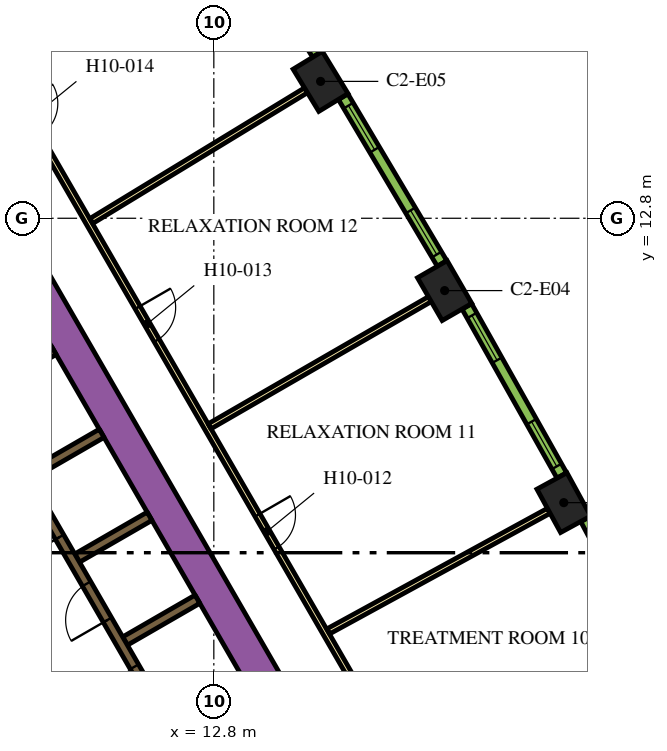
"""IFC4 building model, lengths in metres.
Left out: names, types, materials, properties, quantities, classifications, styles, units other than length and angle.
Written with IfcOpenShell. Run it as: python <this file> out.ifc"""

import sys

from ifc_helpers import new_model, si_unit, direction, frame, frame_2d, origin, origin_2d, place, context, subcontext, project, spatial, rectangle, extrude, element, fill, save


model = new_model("IFC4")
c1 = context("Model", 3, precision=1e-05, world=origin(), true_north=direction((0.0, 1.0)))
c2 = subcontext(c1, "Body", "Model", "MODEL_VIEW")
j1 = project(units=[si_unit("LENGTHUNIT", "METRE"), si_unit("PLANEANGLEUNIT", "RADIAN")], contexts=[c1])
p1 = place(None, origin())
s1 = spatial("IfcSite", under=j1, at=p1, CompositionType="ELEMENT")
p2 = place(p1, origin())
s2 = spatial("IfcBuilding", under=s1, at=p2, CompositionType="ELEMENT")
p3 = place(p2, frame((0.0, 0.0, 130.5)))
s3 = spatial("IfcBuildingStorey", under=s2, at=p3, CompositionType="ELEMENT", Elevation=130.5)
for number, where, z_axis, x_axis in (
    (1, (22.009, 5.317, 0.0), (0.0, 0.0, 1.0), (-0.48, 0.877, 0.0)),
    (2, (18.874, 10.897, 0.0), (0.0, 0.0, 1.0), (-0.5, 0.866, 0.0)),
    (3, (15.609, 16.402, 0.0), (0.0, 0.0, 1.0), (-0.52, 0.854, 0.0)),
):
    element("IfcColumn", number, at=place(p3, frame(where, z_axis=z_axis, x_axis=x_axis)), inside=s3, PredefinedType="COLUMN", context=c2, shape_type="SweptSolid", body=[
        extrude(rectangle(XDim=1.3, YDim=0.9, at=origin_2d()), origin(), (0.0, 0.0, 1.0), 3.9),
    ])
p4 = place(p3, frame((6.776, 13.364, 0.0), z_axis=(0.0, 0.0, 1.0), x_axis=(0.500004177138, -0.8660229921, 0.0)))
e4 = element("IfcWall", 4, at=p4, inside=s3, PredefinedType="SOLIDWALL", context=c2, shape_type="SweptSolid", body=[
    extrude(rectangle(XDim=20.204, YDim=0.9, at=frame_2d((10.102, 0.0))), origin(), (0.0, 0.0, 1.0), 3.9),
])
for number, where, z_axis, x_axis in (
    (5, (6.684, 8.224, 0.0), (0.0, 0.0, 1.0), (0.866, 0.5, 0.0)),
    (6, (7.944, 6.041, 0.0), (0.0, 0.0, 1.0), (0.866, 0.5, 0.0)),
    (7, (9.204, 3.859, 0.0), (0.0, 0.0, 1.0), (0.866, 0.5, 0.0)),
    (8, (10.464, 1.677, 0.0), (0.0, 0.0, 1.0), (0.866, 0.5, 0.0)),
):
    element("IfcWall", number, at=place(p3, frame(where, z_axis=z_axis, x_axis=x_axis)), inside=s3, PredefinedType="SOLIDWALL", context=c2, shape_type="SweptSolid", body=[
        extrude(rectangle(XDim=2.2, YDim=0.25, at=frame_2d((1.1, 0.0))), origin(), (0.0, 0.0, 1.0), 3.9),
    ])
p5 = place(p3, frame((11.553, -0.46, 0.0), z_axis=(0.0, 0.0, 1.0), x_axis=(-0.500006514828, 0.866021642414, 0.0)))
e9 = element("IfcWall", 9, at=p5, inside=s3, PredefinedType="SOLIDWALL", context=c2, shape_type="SweptSolid", body=[
    extrude(rectangle(XDim=12.35, YDim=0.25, at=frame_2d((6.175, 0.0))), origin(), (0.0, 0.0, 1.0), 3.9),
])
p6 = place(p5, frame((0.585, 0.0, 0.0)))
e10 = element("IfcOpeningElement", 10, at=p6, cuts=e9, PredefinedType="OPENING", context=c2, shape_type="SweptSolid", body=[
    extrude(rectangle(XDim=1.1, YDim=2.1, at=frame_2d((0.55, 1.05))), frame((0.0, 0.135, 0.0), z_axis=(0.0, -1.0, 0.0), x_axis=(1.0, 0.0, 0.0)), (0.0, 0.0, 1.0), 0.27),
])
p7 = place(p5, frame((3.105, 0.0, 0.0)))
e11 = element("IfcOpeningElement", 11, at=p7, cuts=e9, PredefinedType="OPENING", context=c2, shape_type="SweptSolid", body=[
    extrude(rectangle(XDim=1.1, YDim=2.1, at=frame_2d((0.55, 1.05))), frame((0.0, 0.135, 0.0), z_axis=(0.0, -1.0, 0.0), x_axis=(1.0, 0.0, 0.0)), (0.0, 0.0, 1.0), 0.27),
])
p8 = place(p5, frame((5.625, 0.0, 0.0)))
e12 = element("IfcOpeningElement", 12, at=p8, cuts=e9, PredefinedType="OPENING", context=c2, shape_type="SweptSolid", body=[
    extrude(rectangle(XDim=1.1, YDim=2.1, at=frame_2d((0.55, 1.05))), frame((0.0, 0.135, 0.0), z_axis=(0.0, -1.0, 0.0), x_axis=(1.0, 0.0, 0.0)), (0.0, 0.0, 1.0), 0.27),
])
p9 = place(p3, frame((8.565, -2.185, 0.0), z_axis=(0.0, 0.0, 1.0), x_axis=(-0.499997954832, 0.866026584559, 0.0)))
e13 = element("IfcWall", 13, at=p9, inside=s3, PredefinedType="SOLIDWALL", context=c2, shape_type="SweptSolid", body=[
    extrude(rectangle(XDim=12.35, YDim=0.25, at=frame_2d((6.175, 0.0))), origin(), (0.0, 0.0, 1.0), 3.9),
])
p10 = place(p9, frame((5.725, 0.0, 0.0)))
e14 = element("IfcOpeningElement", 14, at=p10, cuts=e13, PredefinedType="OPENING", context=c2, shape_type="SweptSolid", body=[
    extrude(rectangle(XDim=0.9, YDim=2.1, at=frame_2d((0.45, 1.05))), frame((0.0, 0.135, 0.0), z_axis=(0.0, -1.0, 0.0), x_axis=(1.0, 0.0, 0.0)), (0.0, 0.0, 1.0), 0.27),
])
p11 = place(p3, frame((6.163, 18.475, 0.0), z_axis=(0.0, 0.0, 1.0), x_axis=(0.500001317485, -0.866024643133, 0.0)))
e15 = element("IfcWall", 15, at=p11, inside=s3, PredefinedType="PARTITIONING", context=c2, shape_type="SweptSolid", body=[
    extrude(rectangle(XDim=25.767, YDim=0.15, at=frame_2d((12.883, 0.0))), origin(), (0.0, 0.0, 1.0), 2.6),
])
p12 = place(p11, frame((21.774, 0.0, 0.0)))
e16 = element("IfcOpeningElement", 16, at=p12, cuts=e15, PredefinedType="OPENING", context=c2, shape_type="SweptSolid", body=[
    extrude(rectangle(XDim=1.0, YDim=2.1, at=frame_2d((0.5, 1.05))), frame((0.0, 0.085, 0.0), z_axis=(0.0, -1.0, 0.0), x_axis=(1.0, 0.0, 0.0)), (0.0, 0.0, 1.0), 0.17),
])
p13 = place(p11, frame((15.571, 0.0, 0.0)))
e17 = element("IfcOpeningElement", 17, at=p13, cuts=e15, PredefinedType="OPENING", context=c2, shape_type="SweptSolid", body=[
    extrude(rectangle(XDim=1.0, YDim=2.1, at=frame_2d((0.5, 1.05))), frame((0.0, 0.085, 0.0), z_axis=(0.0, -1.0, 0.0), x_axis=(1.0, 0.0, 0.0)), (0.0, 0.0, 1.0), 0.17),
])
p14 = place(p11, frame((9.265, 0.0, 0.0)))
e18 = element("IfcOpeningElement", 18, at=p14, cuts=e15, PredefinedType="OPENING", context=c2, shape_type="SweptSolid", body=[
    extrude(rectangle(XDim=1.0, YDim=2.1, at=frame_2d((0.5, 1.05))), frame((0.0, 0.085, 0.0), z_axis=(0.0, -1.0, 0.0), x_axis=(1.0, 0.0, 0.0)), (0.0, 0.0, 1.0), 0.17),
])
p15 = place(p11, frame((3.063, 0.0, 0.0)))
e19 = element("IfcOpeningElement", 19, at=p15, cuts=e15, PredefinedType="OPENING", context=c2, shape_type="SweptSolid", body=[
    extrude(rectangle(XDim=1.0, YDim=2.1, at=frame_2d((0.5, 1.05))), frame((0.0, 0.085, 0.0), z_axis=(0.0, -1.0, 0.0), x_axis=(1.0, 0.0, 0.0)), (0.0, 0.0, 1.0), 0.17),
])
p16 = place(p3, frame((15.225, 16.167, 0.0), z_axis=(0.0, 0.0, 1.0), x_axis=(-0.854088713274, -0.520127359266, 0.0)))
e20 = element("IfcWall", 20, at=p16, inside=s3, PredefinedType="PARTITIONING", context=c2, shape_type="SweptSolid", body=[
    extrude(rectangle(XDim=6.611, YDim=0.15, at=frame_2d((3.305, 0.0))), origin(), (0.0, 0.0, 1.0), 2.6),
])
p17 = place(p3, frame((18.484, 10.672, 0.0), z_axis=(0.0, 0.0, 1.0), x_axis=(-0.866019162053, -0.50001081084, 0.0)))
e21 = element("IfcWall", 21, at=p17, inside=s3, PredefinedType="PARTITIONING", context=c2, shape_type="SweptSolid", body=[
    extrude(rectangle(XDim=6.694, YDim=0.15, at=frame_2d((3.347, 0.0))), origin(), (0.0, 0.0, 1.0), 2.6),
])
p18 = place(p3, frame((21.614, 5.102, 0.0), z_axis=(0.0, 0.0, 1.0), x_axis=(-0.877484555087, -0.479604895287, 0.0)))
e22 = element("IfcWall", 22, at=p18, inside=s3, PredefinedType="PARTITIONING", context=c2, shape_type="SweptSolid", body=[
    extrude(rectangle(XDim=6.611, YDim=0.15, at=frame_2d((3.306, 0.0))), origin(), (0.0, 0.0, 1.0), 2.6),
])
p19 = place(p3, frame((24.977, 0.383, 0.0), z_axis=(0.0, 0.0, 1.0), x_axis=(-0.469323203119, 0.883026461106, 0.0)))
e23 = element("IfcWall", 23, at=p19, inside=s3, PredefinedType="SOLIDWALL", context=c2, shape_type="SweptSolid", body=[
    extrude(rectangle(XDim=5.101, YDim=0.29, at=frame_2d((2.55, 0.0))), origin(), (0.0, 0.0, 1.0), 3.5),
])
p20 = place(p19, frame((0.273, 0.0, 0.9)))
e24 = element("IfcOpeningElement", 24, at=p20, cuts=e23, PredefinedType="OPENING", context=c2, shape_type="SweptSolid", body=[
    extrude(rectangle(XDim=1.35, YDim=2.15, at=frame_2d((0.675, 1.075))), frame((0.0, 0.155, 0.0), z_axis=(0.0, -1.0, 0.0), x_axis=(1.0, 0.0, 0.0)), (0.0, 0.0, 1.0), 0.31),
])
p21 = place(p19, frame((3.478, 0.0, 0.9)))
e25 = element("IfcOpeningElement", 25, at=p21, cuts=e23, PredefinedType="OPENING", context=c2, shape_type="SweptSolid", body=[
    extrude(rectangle(XDim=1.35, YDim=2.15, at=frame_2d((0.675, 1.075))), frame((0.0, 0.155, 0.0), z_axis=(0.0, -1.0, 0.0), x_axis=(1.0, 0.0, 0.0)), (0.0, 0.0, 1.0), 0.31),
])
p22 = place(p3, frame((21.956, 6.033, 0.0), z_axis=(0.0, 0.0, 1.0), x_axis=(-0.48983164787, 0.87181704316, 0.0)))
e26 = element("IfcWall", 26, at=p22, inside=s3, PredefinedType="SOLIDWALL", context=c2, shape_type="SweptSolid", body=[
    extrude(rectangle(XDim=5.1, YDim=0.29, at=frame_2d((2.55, 0.0))), origin(), (0.0, 0.0, 1.0), 3.5),
])
p23 = place(p22, frame((0.273, 0.0, 0.9)))
e27 = element("IfcOpeningElement", 27, at=p23, cuts=e26, PredefinedType="OPENING", context=c2, shape_type="SweptSolid", body=[
    extrude(rectangle(XDim=1.35, YDim=2.15, at=frame_2d((0.675, 1.075))), frame((0.0, 0.155, 0.0), z_axis=(0.0, -1.0, 0.0), x_axis=(1.0, 0.0, 0.0)), (0.0, 0.0, 1.0), 0.31),
])
p24 = place(p22, frame((3.478, 0.0, 0.9)))
e28 = element("IfcOpeningElement", 28, at=p24, cuts=e26, PredefinedType="OPENING", context=c2, shape_type="SweptSolid", body=[
    extrude(rectangle(XDim=1.35, YDim=2.15, at=frame_2d((0.675, 1.075))), frame((0.0, 0.155, 0.0), z_axis=(0.0, -1.0, 0.0), x_axis=(1.0, 0.0, 0.0)), (0.0, 0.0, 1.0), 0.31),
])
p25 = place(p3, frame((18.805, 11.611, 0.0), z_axis=(0.0, 0.0, 1.0), x_axis=(-0.510054281659, 0.860142214847, 0.0)))
e29 = element("IfcWall", 29, at=p25, inside=s3, PredefinedType="SOLIDWALL", context=c2, shape_type="SweptSolid", body=[
    extrude(rectangle(XDim=5.101, YDim=0.29, at=frame_2d((2.55, 0.0))), origin(), (0.0, 0.0, 1.0), 3.5),
])
p26 = place(p25, frame((0.273, 0.0, 0.9)))
e30 = element("IfcOpeningElement", 30, at=p26, cuts=e29, PredefinedType="OPENING", context=c2, shape_type="SweptSolid", body=[
    extrude(rectangle(XDim=1.35, YDim=2.15, at=frame_2d((0.675, 1.075))), frame((0.0, 0.155, 0.0), z_axis=(0.0, -1.0, 0.0), x_axis=(1.0, 0.0, 0.0)), (0.0, 0.0, 1.0), 0.31),
])
p27 = place(p25, frame((3.478, 0.0, 0.9)))
e31 = element("IfcOpeningElement", 31, at=p27, cuts=e29, PredefinedType="OPENING", context=c2, shape_type="SweptSolid", body=[
    extrude(rectangle(XDim=1.35, YDim=2.15, at=frame_2d((0.675, 1.075))), frame((0.0, 0.155, 0.0), z_axis=(0.0, -1.0, 0.0), x_axis=(1.0, 0.0, 0.0)), (0.0, 0.0, 1.0), 0.31),
])
p28 = place(p3, frame((15.524, 17.114, 0.0), z_axis=(0.0, 0.0, 1.0), x_axis=(-0.530072082134, 0.847952585787, 0.0)))
e32 = element("IfcWall", 32, at=p28, inside=s3, PredefinedType="SOLIDWALL", context=c2, shape_type="SweptSolid", body=[
    extrude(rectangle(XDim=5.1, YDim=0.29, at=frame_2d((2.55, 0.0))), origin(), (0.0, 0.0, 1.0), 3.5),
])
p29 = place(p28, frame((0.273, 0.0, 0.9)))
e33 = element("IfcOpeningElement", 33, at=p29, cuts=e32, PredefinedType="OPENING", context=c2, shape_type="SweptSolid", body=[
    extrude(rectangle(XDim=1.35, YDim=2.15, at=frame_2d((0.675, 1.075))), frame((0.0, 0.155, 0.0), z_axis=(0.0, -1.0, 0.0), x_axis=(1.0, 0.0, 0.0)), (0.0, 0.0, 1.0), 0.31),
])
p30 = place(p28, frame((3.478, 0.0, 0.9)))
e34 = element("IfcOpeningElement", 34, at=p30, cuts=e32, PredefinedType="OPENING", context=c2, shape_type="SweptSolid", body=[
    extrude(rectangle(XDim=1.35, YDim=2.15, at=frame_2d((0.675, 1.075))), frame((0.0, 0.155, 0.0), z_axis=(0.0, -1.0, 0.0), x_axis=(1.0, 0.0, 0.0)), (0.0, 0.0, 1.0), 0.31),
])
p31 = place(p6, origin())
e35 = element("IfcDoor", 35, at=p31, inside=s3, OperationType="DOUBLE_DOOR_SLIDING", PredefinedType="DOOR", context=c2, shape_type="SweptSolid", body=[
    extrude(rectangle(XDim=1.1, YDim=2.1, at=frame_2d((0.55, 1.05))), frame((0.0, 0.025, 0.0), z_axis=(0.0, -1.0, 0.0), x_axis=(1.0, 0.0, 0.0)), (0.0, 0.0, 1.0), 0.05),
])
fill(e10, e35)
p32 = place(p7, origin())
e36 = element("IfcDoor", 36, at=p32, inside=s3, OperationType="DOUBLE_DOOR_SLIDING", PredefinedType="DOOR", context=c2, shape_type="SweptSolid", body=[
    extrude(rectangle(XDim=1.1, YDim=2.1, at=frame_2d((0.55, 1.05))), frame((0.0, 0.025, 0.0), z_axis=(0.0, -1.0, 0.0), x_axis=(1.0, 0.0, 0.0)), (0.0, 0.0, 1.0), 0.05),
])
fill(e11, e36)
p33 = place(p8, origin())
e37 = element("IfcDoor", 37, at=p33, inside=s3, OperationType="DOUBLE_DOOR_SLIDING", PredefinedType="DOOR", context=c2, shape_type="SweptSolid", body=[
    extrude(rectangle(XDim=1.1, YDim=2.1, at=frame_2d((0.55, 1.05))), frame((0.0, 0.025, 0.0), z_axis=(0.0, -1.0, 0.0), x_axis=(1.0, 0.0, 0.0)), (0.0, 0.0, 1.0), 0.05),
])
fill(e12, e37)
p34 = place(p13, origin())
e38 = element("IfcDoor", 38, at=p34, inside=s3, OperationType="SINGLE_SWING_LEFT", PredefinedType="DOOR", context=c2, shape_type="SweptSolid", body=[
    extrude(rectangle(XDim=1.0, YDim=2.1, at=frame_2d((0.5, 1.05))), frame((0.0, 0.025, 0.0), z_axis=(0.0, -1.0, 0.0), x_axis=(1.0, 0.0, 0.0)), (0.0, 0.0, 1.0), 0.05),
])
fill(e17, e38)
p35 = place(p14, origin())
e39 = element("IfcDoor", 39, at=p35, inside=s3, OperationType="SINGLE_SWING_RIGHT", PredefinedType="DOOR", context=c2, shape_type="SweptSolid", body=[
    extrude(rectangle(XDim=1.0, YDim=2.1, at=frame_2d((0.5, 1.05))), frame((0.0, 0.025, 0.0), z_axis=(0.0, -1.0, 0.0), x_axis=(1.0, 0.0, 0.0)), (0.0, 0.0, 1.0), 0.05),
])
fill(e18, e39)
p36 = place(p23, origin())
e40 = element("IfcWindow", 40, at=p36, inside=s3, PartitioningType="DOUBLE_PANEL_VERTICAL", PredefinedType="WINDOW", context=c2, shape_type="SweptSolid", body=[
    extrude(rectangle(XDim=1.35, YDim=2.15, at=frame_2d((0.675, 1.075))), frame((0.0, 0.015, 0.0), z_axis=(0.0, -1.0, 0.0), x_axis=(1.0, 0.0, 0.0)), (0.0, 0.0, 1.0), 0.06),
])
fill(e27, e40)
p37 = place(p24, origin())
e41 = element("IfcWindow", 41, at=p37, inside=s3, PartitioningType="DOUBLE_PANEL_VERTICAL", PredefinedType="WINDOW", context=c2, shape_type="SweptSolid", body=[
    extrude(rectangle(XDim=1.35, YDim=2.15, at=frame_2d((0.675, 1.075))), frame((0.0, 0.015, 0.0), z_axis=(0.0, -1.0, 0.0), x_axis=(1.0, 0.0, 0.0)), (0.0, 0.0, 1.0), 0.06),
])
fill(e28, e41)
p38 = place(p26, origin())
e42 = element("IfcWindow", 42, at=p38, inside=s3, PartitioningType="DOUBLE_PANEL_VERTICAL", PredefinedType="WINDOW", context=c2, shape_type="SweptSolid", body=[
    extrude(rectangle(XDim=1.35, YDim=2.15, at=frame_2d((0.675, 1.075))), frame((0.0, 0.015, 0.0), z_axis=(0.0, -1.0, 0.0), x_axis=(1.0, 0.0, 0.0)), (0.0, 0.0, 1.0), 0.06),
])
fill(e30, e42)
p39 = place(p27, origin())
e43 = element("IfcWindow", 43, at=p39, inside=s3, PartitioningType="DOUBLE_PANEL_VERTICAL", PredefinedType="WINDOW", context=c2, shape_type="SweptSolid", body=[
    extrude(rectangle(XDim=1.35, YDim=2.15, at=frame_2d((0.675, 1.075))), frame((0.0, 0.015, 0.0), z_axis=(0.0, -1.0, 0.0), x_axis=(1.0, 0.0, 0.0)), (0.0, 0.0, 1.0), 0.06),
])
fill(e31, e43)
save(model, sys.argv[1])
